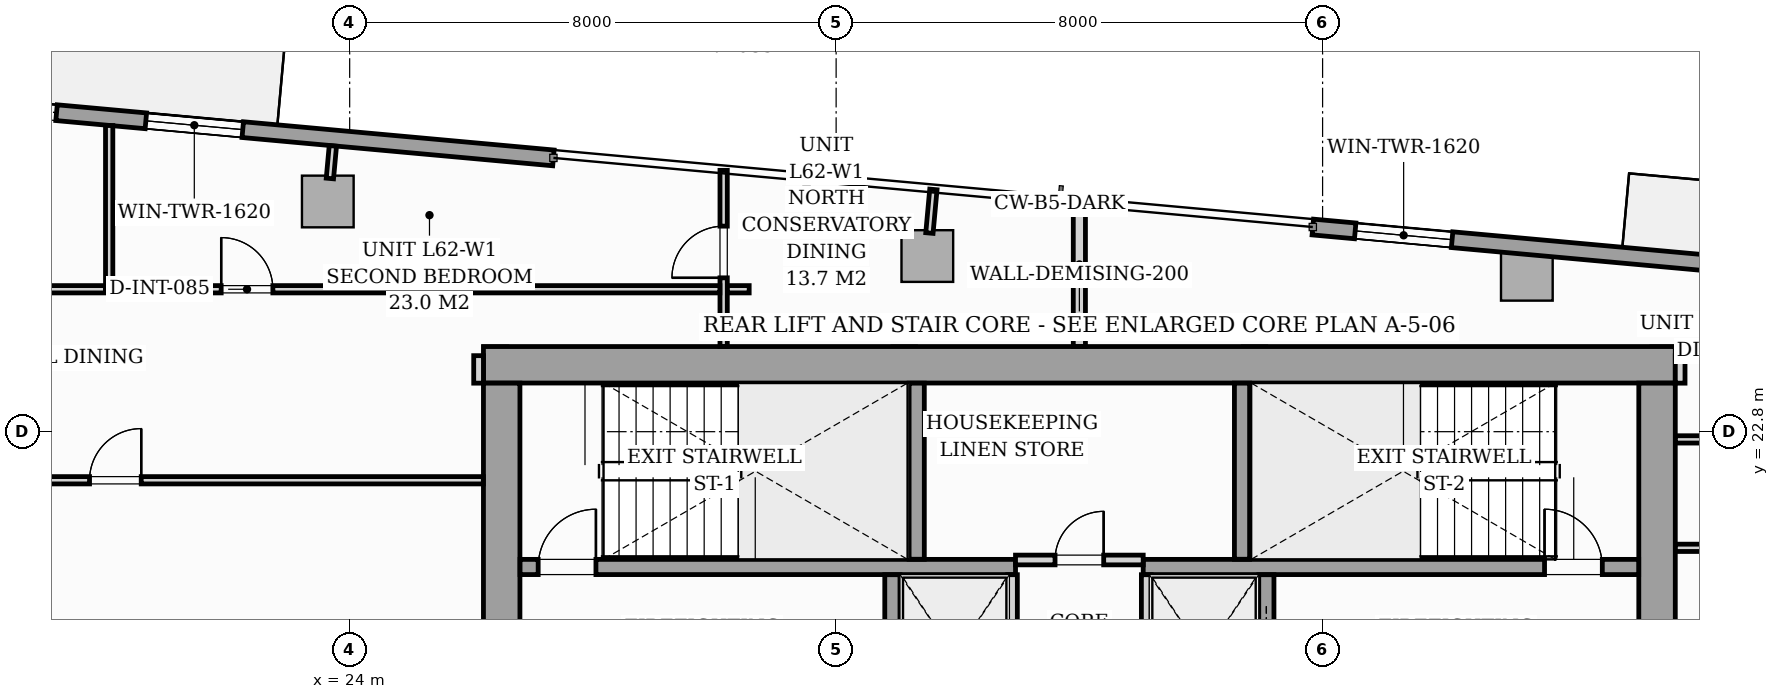
"""IFC4 building model, lengths in metres.
Left out: names, types, materials, properties, quantities, classifications, styles, units other than length and angle.
Written with IfcOpenShell. Run it as: python <this file> out.ifc"""

import sys

from ifc_helpers import new_model, si_unit, direction, frame, frame_2d, origin, origin_2d, place, context, subcontext, project, spatial, rectangle, i_section, extrude, source, transform, mapped, element, fill, save


model = new_model("IFC4")
c1 = context("Model", 3, precision=1e-05, world=origin(), true_north=direction((0.0, 1.0)))
c2 = subcontext(c1, "Body", "Model", "MODEL_VIEW")
j1 = project(units=[si_unit("LENGTHUNIT", "METRE"), si_unit("PLANEANGLEUNIT", "RADIAN")], contexts=[c1])
p1 = place(None, origin())
s1 = spatial("IfcSite", under=j1, at=p1, CompositionType="ELEMENT")
p2 = place(p1, origin())
s2 = spatial("IfcBuilding", under=s1, at=p2, CompositionType="ELEMENT")
p3 = place(p2, frame((0.0, 0.0, 216.6)))
s3 = spatial("IfcBuildingStorey", under=s2, at=p3, CompositionType="ELEMENT", Elevation=216.6)
m1 = source(origin(), c2, "Body", "SweptSolid", [
    extrude(i_section(OverallWidth=0.409, OverallDepth=0.425, WebThickness=0.033, FlangeThickness=0.052, FilletRadius=0.018, at=origin_2d()), origin(), (0.0, 0.0, 1.0), 3.296),
])
for number, where, z_axis, x_axis in (
    (1, (26.4, 24.0, 0.002), (0.0, 0.0, 1.0), (1.0, 0.0, 0.0)),
    (2, (33.12, 24.0, 0.002), (0.0, 0.0, 1.0), (1.0, 0.0, 0.0)),
    (3, (38.88, 24.0, 0.002), (0.0, 0.0, 1.0), (1.0, 0.0, 0.0)),
    (4, (45.6, 24.0, 0.002), (0.0, 0.0, 1.0), (1.0, 0.0, 0.0)),
):
    element("IfcColumn", number, at=place(p3, frame(where, z_axis=z_axis, x_axis=x_axis)), inside=s3, PredefinedType="PILASTER", context=c2, shape_type="MappedRepresentation", body=[
        mapped(m1, transform((0.0, 0.0, 0.0), scale=1.0)),
    ])
m2 = source(origin(), c2, "Body", "SweptSolid", [
    extrude(rectangle(XDim=0.85, YDim=0.85, at=origin_2d()), origin(), (0.0, 0.0, 1.0), 3.294),
])
for number, where, z_axis, x_axis in (
    (5, (23.64, 26.585, 0.004), (0.0, 0.0, 1.0), (0.996, -0.091, 0.0)),
    (6, (33.5, 25.688, 0.004), (0.0, 0.0, 1.0), (0.996, -0.091, 0.0)),
    (7, (43.359, 25.38, 0.004), (0.0, 0.0, 1.0), (0.996, -0.091, 0.0)),
):
    element("IfcColumn", number, at=place(p3, frame(where, z_axis=z_axis, x_axis=x_axis)), inside=s3, PredefinedType="COLUMN", context=c2, shape_type="MappedRepresentation", body=[
        mapped(m2, transform((0.0, 0.0, 0.0), scale=1.0)),
    ])
p4 = place(p3, frame((12.781, 28.628, 0.0), z_axis=(0.0, 0.0, 1.0), x_axis=(0.995884584572, -0.090630536861, 0.0)))
e8 = element("IfcWall", 8, at=p4, inside=s3, PredefinedType="STANDARD", context=c2, shape_type="SweptSolid", body=[
    extrude(rectangle(XDim=14.63, YDim=0.26, at=frame_2d((7.315, 0.0))), origin(), (0.0, 0.0, 1.0), 3.04),
])
p5 = place(p4, frame((4.625, 0.0, 0.0)))
e9 = element("IfcOpeningElement", 9, at=p5, cuts=e8, PredefinedType="OPENING", context=c2, shape_type="SweptSolid", body=[
    extrude(rectangle(XDim=1.8, YDim=2.06, at=frame_2d((0.9, 1.03))), frame((0.0, 0.14, 0.0), z_axis=(0.0, -1.0, 0.0), x_axis=(1.0, 0.0, 0.0)), (0.0, 0.0, 1.0), 0.28),
])
p6 = place(p4, frame((7.9, 0.0, 0.65)))
e10 = element("IfcOpeningElement", 10, at=p6, cuts=e8, PredefinedType="OPENING", context=c2, shape_type="SweptSolid", body=[
    extrude(rectangle(XDim=1.6, YDim=1.5, at=frame_2d((0.8, 0.75))), frame((0.0, 0.14, 0.0), z_axis=(0.0, -1.0, 0.0), x_axis=(1.0, 0.0, 0.0)), (0.0, 0.0, 1.0), 0.28),
])
p7 = place(p3, frame((39.839, 26.166, 0.0), z_axis=(0.0, 0.0, 1.0), x_axis=(0.995884447498, -0.090632043071, 0.0)))
e11 = element("IfcWall", 11, at=p7, inside=s3, PredefinedType="STANDARD", context=c2, shape_type="SweptSolid", body=[
    extrude(rectangle(XDim=14.63, YDim=0.26, at=frame_2d((7.315, 0.0))), origin(), (0.0, 0.0, 1.0), 3.04),
])
p8 = place(p7, frame((10.34, 0.0, 0.0)))
e12 = element("IfcOpeningElement", 12, at=p8, cuts=e11, PredefinedType="OPENING", context=c2, shape_type="SweptSolid", body=[
    extrude(rectangle(XDim=1.8, YDim=2.06, at=frame_2d((0.9, 1.03))), frame((0.0, 0.14, 0.0), z_axis=(0.0, -1.0, 0.0), x_axis=(1.0, 0.0, 0.0)), (0.0, 0.0, 1.0), 0.28),
])
p9 = place(p7, frame((0.7, 0.0, 0.65)))
e13 = element("IfcOpeningElement", 13, at=p9, cuts=e11, PredefinedType="OPENING", context=c2, shape_type="SweptSolid", body=[
    extrude(rectangle(XDim=1.6, YDim=1.5, at=frame_2d((0.8, 0.75))), frame((0.0, 0.14, 0.0), z_axis=(0.0, -1.0, 0.0), x_axis=(1.0, 0.0, 0.0)), (0.0, 0.0, 1.0), 0.28),
])
p10 = place(p3, frame((26.2, 23.9, 0.0), z_axis=(0.0, 0.0, 1.0), x_axis=(1.0, 0.0, 0.0)))
e14 = element("IfcWall", 14, at=p10, inside=s3, PredefinedType="SHEAR", context=c2, shape_type="SweptSolid", body=[
    extrude(rectangle(XDim=19.6, YDim=0.6, at=frame_2d((9.8, 0.0))), origin(), (0.0, 0.0, 1.0), 3.3),
])
for number, where, z_axis, x_axis in (
    (15, (26.5, 17.802, 0.0), (0.0, 0.0, 1.0), (0.0, 1.0, 0.0)),
    (16, (45.5, 17.802, 0.0), (0.0, 0.0, 1.0), (0.0, 1.0, 0.0)),
):
    element("IfcWall", number, at=place(p3, frame(where, z_axis=z_axis, x_axis=x_axis)), inside=s3, PredefinedType="SHEAR", context=c2, shape_type="SweptSolid", body=[
        extrude(rectangle(XDim=5.796, YDim=0.6, at=frame_2d((2.898, 0.0))), origin(), (0.0, 0.0, 1.0), 3.3),
    ])
p11 = place(p3, frame((26.802, 20.575, 0.0), z_axis=(0.0, 0.0, 1.0), x_axis=(1.0, 0.0, 0.0)))
e17 = element("IfcWall", 17, at=p11, inside=s3, PredefinedType="SOLIDWALL", context=c2, shape_type="SweptSolid", body=[
    extrude(rectangle(XDim=8.148, YDim=0.25, at=frame_2d((4.074, 0.0))), origin(), (0.0, 0.0, 1.0), 3.3),
])
p12 = place(p11, frame((0.298, 0.0, 0.0)))
e18 = element("IfcOpeningElement", 18, at=p12, cuts=e17, PredefinedType="OPENING", context=c2, shape_type="SweptSolid", body=[
    extrude(rectangle(XDim=0.95, YDim=2.06, at=frame_2d((0.475, 1.03))), frame((0.0, 0.135, 0.0), z_axis=(0.0, -1.0, 0.0), x_axis=(1.0, 0.0, 0.0)), (0.0, 0.0, 1.0), 0.27),
])
p13 = place(p3, frame((37.05, 20.575, 0.0), z_axis=(0.0, 0.0, 1.0), x_axis=(1.0, 0.0, 0.0)))
e19 = element("IfcWall", 19, at=p13, inside=s3, PredefinedType="SOLIDWALL", context=c2, shape_type="SweptSolid", body=[
    extrude(rectangle(XDim=8.148, YDim=0.25, at=frame_2d((4.074, 0.0))), origin(), (0.0, 0.0, 1.0), 3.3),
])
p14 = place(p13, frame((6.6, 0.0, 0.0)))
e20 = element("IfcOpeningElement", 20, at=p14, cuts=e19, PredefinedType="OPENING", context=c2, shape_type="SweptSolid", body=[
    extrude(rectangle(XDim=0.95, YDim=2.06, at=frame_2d((0.475, 1.03))), frame((0.0, 0.135, 0.0), z_axis=(0.0, -1.0, 0.0), x_axis=(1.0, 0.0, 0.0)), (0.0, 0.0, 1.0), 0.27),
])
for number, where, z_axis, x_axis in (
    (21, (33.325, 20.702, 0.0), (0.0, 0.0, 1.0), (0.0, 1.0, 0.0)),
    (22, (38.675, 20.702, 0.0), (0.0, 0.0, 1.0), (0.0, 1.0, 0.0)),
):
    element("IfcWall", number, at=place(p3, frame(where, z_axis=z_axis, x_axis=x_axis)), inside=s3, PredefinedType="SOLIDWALL", context=c2, shape_type="SweptSolid", body=[
        extrude(rectangle(XDim=2.896, YDim=0.25, at=frame_2d((1.448, 0.0))), origin(), (0.0, 0.0, 1.0), 3.3),
    ])
p15 = place(p3, frame((32.925, 17.802, 0.0), z_axis=(0.0, 0.0, 1.0), x_axis=(0.0, 1.0, 0.0)))
e23 = element("IfcWall", 23, at=p15, inside=s3, PredefinedType="SOLIDWALL", context=c2, shape_type="SweptSolid", body=[
    extrude(rectangle(XDim=2.646, YDim=0.25, at=frame_2d((1.323, 0.0))), origin(), (0.0, 0.0, 1.0), 3.3),
])
p16 = place(p15, frame((0.548, 0.0, 0.0)))
e24 = element("IfcOpeningElement", 24, at=p16, cuts=e23, PredefinedType="OPENING", context=c2, shape_type="SweptSolid", body=[
    extrude(rectangle(XDim=1.1, YDim=2.08, at=frame_2d((0.55, 1.04))), frame((0.0, 0.135, 0.0), z_axis=(0.0, -1.0, 0.0), x_axis=(1.0, 0.0, 0.0)), (0.0, 0.0, 1.0), 0.27),
])
for number, where, z_axis, x_axis in (
    (25, (34.9, 17.802, 0.0), (0.0, 0.0, 1.0), (0.0, 1.0, 0.0)),
    (26, (37.1, 17.802, 0.0), (0.0, 0.0, 1.0), (0.0, 1.0, 0.0)),
):
    element("IfcWall", number, at=place(p3, frame(where, z_axis=z_axis, x_axis=x_axis)), inside=s3, PredefinedType="PARTITIONING", context=c2, shape_type="SweptSolid", body=[
        extrude(rectangle(XDim=2.646, YDim=0.16, at=frame_2d((1.323, 0.0))), origin(), (0.0, 0.0, 1.0), 3.04),
    ])
p17 = place(p3, frame((39.075, 17.802, 0.0), z_axis=(0.0, 0.0, 1.0), x_axis=(0.0, 1.0, 0.0)))
e27 = element("IfcWall", 27, at=p17, inside=s3, PredefinedType="SOLIDWALL", context=c2, shape_type="SweptSolid", body=[
    extrude(rectangle(XDim=2.646, YDim=0.25, at=frame_2d((1.323, 0.0))), origin(), (0.0, 0.0, 1.0), 3.3),
])
p18 = place(p17, frame((0.548, 0.0, 0.0)))
e28 = element("IfcOpeningElement", 28, at=p18, cuts=e27, PredefinedType="OPENING", context=c2, shape_type="SweptSolid", body=[
    extrude(rectangle(XDim=1.1, YDim=2.08, at=frame_2d((0.55, 1.04))), frame((0.0, 0.135, 0.0), z_axis=(0.0, -1.0, 0.0), x_axis=(1.0, 0.0, 0.0)), (0.0, 0.0, 1.0), 0.27),
])
p19 = place(p3, frame((34.95, 20.69, 0.0), z_axis=(0.0, 0.0, 1.0), x_axis=(1.0, 0.0, 0.0)))
e29 = element("IfcWall", 29, at=p19, inside=s3, PredefinedType="PARTITIONING", context=c2, shape_type="SweptSolid", body=[
    extrude(rectangle(XDim=2.1, YDim=0.16, at=frame_2d((1.05, 0.0))), origin(), (0.0, 0.0, 1.0), 3.04),
])
p20 = place(p19, frame((0.65, 0.0, 0.0)))
e30 = element("IfcOpeningElement", 30, at=p20, cuts=e29, PredefinedType="OPENING", context=c2, shape_type="SweptSolid", body=[
    extrude(rectangle(XDim=0.8, YDim=2.05, at=frame_2d((0.4, 1.025))), frame((0.0, 0.09, 0.0), z_axis=(0.0, -1.0, 0.0), x_axis=(1.0, 0.0, 0.0)), (0.0, 0.0, 1.0), 0.18),
])
for number, where, z_axis, x_axis in (
    (31, (26.12, 23.598, 0.0), (0.0, 0.0, 1.0), (0.0, 1.0, 0.0)),
    (32, (45.88, 23.598, 0.0), (0.0, 0.0, 1.0), (0.0, 1.0, 0.0)),
):
    element("IfcWall", number, at=place(p3, frame(where, z_axis=z_axis, x_axis=x_axis)), inside=s3, PredefinedType="PARTITIONING", context=c2, shape_type="SweptSolid", body=[
        extrude(rectangle(XDim=0.452, YDim=0.16, at=frame_2d((0.226, 0.0))), origin(), (0.0, 0.0, 1.0), 3.04),
    ])
p21 = place(p3, frame((36.0, 24.202, 0.0), z_axis=(0.0, 0.0, 1.0), x_axis=(0.0, 1.0, 0.0)))
e33 = element("IfcWall", 33, at=p21, inside=s3, PredefinedType="PARTITIONING", context=c2, shape_type="SweptSolid", body=[
    extrude(rectangle(XDim=2.363, YDim=0.2, at=frame_2d((1.182, 0.0))), origin(), (0.0, 0.0, 1.0), 3.04),
])
p22 = place(p3, frame((30.15, 24.202, 0.0), z_axis=(0.0, 0.0, 1.0), x_axis=(0.0, 1.0, 0.0)))
e34 = element("IfcWall", 34, at=p22, inside=s3, PredefinedType="PARTITIONING", context=c2, shape_type="SweptSolid", body=[
    extrude(rectangle(XDim=2.896, YDim=0.12, at=frame_2d((1.448, 0.0))), origin(), (0.0, 0.0, 1.0), 3.04),
])
p23 = place(p22, frame((1.128, 0.0, 0.0)))
e35 = element("IfcOpeningElement", 35, at=p23, cuts=e34, PredefinedType="OPENING", context=c2, shape_type="SweptSolid", body=[
    extrude(rectangle(XDim=0.85, YDim=2.05, at=frame_2d((0.425, 1.025))), frame((0.0, 0.07, 0.0), z_axis=(0.0, -1.0, 0.0), x_axis=(1.0, 0.0, 0.0)), (0.0, 0.0, 1.0), 0.14),
])
p24 = place(p3, frame((20.045, 25.142, 0.0), z_axis=(0.0, 0.0, 1.0), x_axis=(0.0, 1.0, 0.0)))
e36 = element("IfcWall", 36, at=p24, inside=s3, PredefinedType="PARTITIONING", context=c2, shape_type="SweptSolid", body=[
    extrude(rectangle(XDim=2.692, YDim=0.12, at=frame_2d((1.346, 0.0))), origin(), (0.0, 0.0, 1.0), 3.04),
])
p25 = place(p3, frame((10.034, 25.142, 0.0), z_axis=(0.0, 0.0, 1.0), x_axis=(1.0, 0.0, 0.0)))
e37 = element("IfcWall", 37, at=p25, inside=s3, PredefinedType="PARTITIONING", context=c2, shape_type="SweptSolid", body=[
    extrude(rectangle(XDim=9.949, YDim=0.12, at=frame_2d((4.975, 0.0))), origin(), (0.0, 0.0, 1.0), 3.04),
])
p26 = place(p25, frame((2.5, 0.0, 0.0)))
e38 = element("IfcOpeningElement", 38, at=p26, cuts=e37, PredefinedType="OPENING", context=c2, shape_type="SweptSolid", body=[
    extrude(rectangle(XDim=0.85, YDim=2.05, at=frame_2d((0.425, 1.025))), frame((0.0, 0.07, 0.0), z_axis=(0.0, -1.0, 0.0), x_axis=(1.0, 0.0, 0.0)), (0.0, 0.0, 1.0), 0.14),
])
p27 = place(p3, frame((20.107, 25.142, 0.0), z_axis=(0.0, 0.0, 1.0), x_axis=(1.0, 0.0, 0.0)))
e39 = element("IfcWall", 39, at=p27, inside=s3, PredefinedType="PARTITIONING", context=c2, shape_type="SweptSolid", body=[
    extrude(rectangle(XDim=9.981, YDim=0.12, at=frame_2d((4.99, 0.0))), origin(), (0.0, 0.0, 1.0), 3.04),
])
p28 = place(p27, frame((1.78, 0.0, 0.0)))
e40 = element("IfcOpeningElement", 40, at=p28, cuts=e39, PredefinedType="OPENING", context=c2, shape_type="SweptSolid", body=[
    extrude(rectangle(XDim=0.85, YDim=2.05, at=frame_2d((0.425, 1.025))), frame((0.0, 0.07, 0.0), z_axis=(0.0, -1.0, 0.0), x_axis=(1.0, 0.0, 0.0)), (0.0, 0.0, 1.0), 0.14),
])
p29 = place(p3, frame((30.212, 25.142, 0.0), z_axis=(0.0, 0.0, 1.0), x_axis=(1.0, 0.0, 0.0)))
e41 = element("IfcWall", 41, at=p29, inside=s3, PredefinedType="PARTITIONING", context=c2, shape_type="SweptSolid", body=[
    extrude(rectangle(XDim=0.358, YDim=0.12, at=frame_2d((0.179, 0.0))), origin(), (0.0, 0.0, 1.0), 3.04),
])
p30 = place(p3, frame((9.748, 22.001, 0.0), z_axis=(0.0, 0.0, 1.0), x_axis=(1.0, 0.0, 0.0)))
e42 = element("IfcWall", 42, at=p30, inside=s3, PredefinedType="PARTITIONING", context=c2, shape_type="SweptSolid", body=[
    extrude(rectangle(XDim=16.45, YDim=0.12, at=frame_2d((8.225, 0.0))), origin(), (0.0, 0.0, 1.0), 3.04),
])
p31 = place(p30, frame((9.974, 0.0, 0.0)))
e43 = element("IfcOpeningElement", 43, at=p31, cuts=e42, PredefinedType="OPENING", context=c2, shape_type="SweptSolid", body=[
    extrude(rectangle(XDim=0.85, YDim=2.05, at=frame_2d((0.425, 1.025))), frame((0.0, 0.07, 0.0), z_axis=(0.0, -1.0, 0.0), x_axis=(1.0, 0.0, 0.0)), (0.0, 0.0, 1.0), 0.14),
])
p32 = place(p3, frame((45.802, 22.673, 0.0), z_axis=(0.0, 0.0, 1.0), x_axis=(1.0, 0.0, 0.0)))
e44 = element("IfcWall", 44, at=p32, inside=s3, PredefinedType="PARTITIONING", context=c2, shape_type="SweptSolid", body=[
    extrude(rectangle(XDim=9.402, YDim=0.12, at=frame_2d((4.701, 0.0))), origin(), (0.0, 0.0, 1.0), 3.04),
])
p33 = place(p32, frame((4.397, 0.0, 0.0)))
e45 = element("IfcOpeningElement", 45, at=p33, cuts=e44, PredefinedType="OPENING", context=c2, shape_type="SweptSolid", body=[
    extrude(rectangle(XDim=0.85, YDim=2.05, at=frame_2d((0.425, 1.025))), frame((0.0, 0.07, 0.0), z_axis=(0.0, -1.0, 0.0), x_axis=(1.0, 0.0, 0.0)), (0.0, 0.0, 1.0), 0.14),
])
p34 = place(p3, frame((45.802, 20.89, 0.0), z_axis=(0.0, 0.0, 1.0), x_axis=(1.0, 0.0, 0.0)))
e46 = element("IfcWall", 46, at=p34, inside=s3, PredefinedType="PARTITIONING", context=c2, shape_type="SweptSolid", body=[
    extrude(rectangle(XDim=10.677, YDim=0.12, at=frame_2d((5.339, 0.0))), origin(), (0.0, 0.0, 1.0), 3.04),
])
p35 = place(p34, frame((5.062, 0.0, 0.0)))
e47 = element("IfcOpeningElement", 47, at=p35, cuts=e46, PredefinedType="OPENING", context=c2, shape_type="SweptSolid", body=[
    extrude(rectangle(XDim=0.85, YDim=2.05, at=frame_2d((0.425, 1.025))), frame((0.0, 0.07, 0.0), z_axis=(0.0, -1.0, 0.0), x_axis=(1.0, 0.0, 0.0)), (0.0, 0.0, 1.0), 0.14),
])
p36 = place(p3, frame((23.675, 26.964, 0.0), z_axis=(0.0, 0.0, 1.0), x_axis=(0.090740281653, 0.995874591144, 0.0)))
e48 = element("IfcWall", 48, at=p36, inside=s3, PredefinedType="PARTITIONING", context=c2, shape_type="SweptSolid", body=[
    extrude(rectangle(XDim=0.538, YDim=0.12, at=frame_2d((0.269, 0.0))), origin(), (0.0, 0.0, 1.0), 3.04),
])
p37 = place(p3, frame((33.534, 26.067, 0.0), z_axis=(0.0, 0.0, 1.0), x_axis=(0.090535746043, 0.995893206468, 0.0)))
e49 = element("IfcWall", 49, at=p37, inside=s3, PredefinedType="PARTITIONING", context=c2, shape_type="SweptSolid", body=[
    extrude(rectangle(XDim=0.72, YDim=0.12, at=frame_2d((0.36, 0.0))), origin(), (0.0, 0.0, 1.0), 3.04),
])
m3 = source(origin(), c2, "Body", "SweptSolid", [
    extrude(rectangle(XDim=1.8, YDim=2.06, at=frame_2d((0.9, 1.03))), frame((0.0, 0.025, 0.0), z_axis=(0.0, -1.0, 0.0), x_axis=(1.0, 0.0, 0.0)), (0.0, 0.0, 1.0), 0.05),
])
p38 = place(p5, origin())
e50 = element("IfcDoor", 50, at=p38, inside=s3, OperationType="SLIDING_TO_LEFT", PredefinedType="DOOR", context=c2, shape_type="MappedRepresentation", body=[
    mapped(m3, transform((0.0, 0.0, 0.0), scale=1.0)),
])
fill(e9, e50)
m4 = source(origin(), c2, "Body", "SweptSolid", [
    extrude(rectangle(XDim=1.6, YDim=1.5, at=frame_2d((0.8, 0.75))), frame((0.0, 0.03, 0.0), z_axis=(0.0, -1.0, 0.0), x_axis=(1.0, 0.0, 0.0)), (0.0, 0.0, 1.0), 0.06),
])
p39 = place(p6, origin())
e51 = element("IfcWindow", 51, at=p39, inside=s3, PartitioningType="SINGLE_PANEL", PredefinedType="WINDOW", context=c2, shape_type="MappedRepresentation", body=[
    mapped(m4, transform((0.0, 0.0, 0.0), scale=1.0)),
])
fill(e10, e51)
p40 = place(p9, origin())
e52 = element("IfcWindow", 52, at=p40, inside=s3, PartitioningType="SINGLE_PANEL", PredefinedType="WINDOW", context=c2, shape_type="MappedRepresentation", body=[
    mapped(m4, transform((0.0, 0.0, 0.0), scale=1.0)),
])
fill(e13, e52)
m5 = source(origin(), c2, "Body", "SweptSolid", [
    extrude(rectangle(XDim=0.95, YDim=2.06, at=frame_2d((0.475, 1.03))), frame((0.0, 0.025, 0.0), z_axis=(0.0, -1.0, 0.0), x_axis=(1.0, 0.0, 0.0)), (0.0, 0.0, 1.0), 0.05),
])
p41 = place(p12, origin())
e53 = element("IfcDoor", 53, at=p41, inside=s3, OperationType="SINGLE_SWING_RIGHT", PredefinedType="DOOR", context=c2, shape_type="MappedRepresentation", body=[
    mapped(m5, transform((0.0, 0.0, 0.0), scale=1.0)),
])
fill(e18, e53)
p42 = place(p14, origin())
e54 = element("IfcDoor", 54, at=p42, inside=s3, OperationType="SINGLE_SWING_LEFT", PredefinedType="DOOR", context=c2, shape_type="MappedRepresentation", body=[
    mapped(m5, transform((0.0, 0.0, 0.0), scale=1.0)),
])
fill(e20, e54)
m6 = source(origin(), c2, "Body", "SweptSolid", [
    extrude(rectangle(XDim=0.8, YDim=2.05, at=frame_2d((0.4, 1.025))), frame((0.0, 0.025, 0.0), z_axis=(0.0, -1.0, 0.0), x_axis=(1.0, 0.0, 0.0)), (0.0, 0.0, 1.0), 0.05),
])
p43 = place(p20, origin())
e55 = element("IfcDoor", 55, at=p43, inside=s3, OperationType="SINGLE_SWING_RIGHT", PredefinedType="DOOR", context=c2, shape_type="MappedRepresentation", body=[
    mapped(m6, transform((0.0, 0.0, 0.0), scale=1.0)),
])
fill(e30, e55)
m7 = source(origin(), c2, "Body", "SweptSolid", [
    extrude(rectangle(XDim=0.85, YDim=2.05, at=frame_2d((0.425, 1.025))), frame((0.0, 0.025, 0.0), z_axis=(0.0, -1.0, 0.0), x_axis=(1.0, 0.0, 0.0)), (0.0, 0.0, 1.0), 0.05),
])
p44 = place(p23, origin())
e56 = element("IfcDoor", 56, at=p44, inside=s3, OperationType="SINGLE_SWING_LEFT", PredefinedType="DOOR", context=c2, shape_type="MappedRepresentation", body=[
    mapped(m7, transform((0.0, 0.0, 0.0), scale=1.0)),
])
fill(e35, e56)
p45 = place(p28, origin())
e57 = element("IfcDoor", 57, at=p45, inside=s3, OperationType="SINGLE_SWING_LEFT", PredefinedType="DOOR", context=c2, shape_type="MappedRepresentation", body=[
    mapped(m7, transform((0.0, 0.0, 0.0), scale=1.0)),
])
fill(e40, e57)
p46 = place(p31, origin())
e58 = element("IfcDoor", 58, at=p46, inside=s3, OperationType="SINGLE_SWING_RIGHT", PredefinedType="DOOR", context=c2, shape_type="MappedRepresentation", body=[
    mapped(m7, transform((0.0, 0.0, 0.0), scale=1.0)),
])
fill(e43, e58)
save(model, sys.argv[1])
